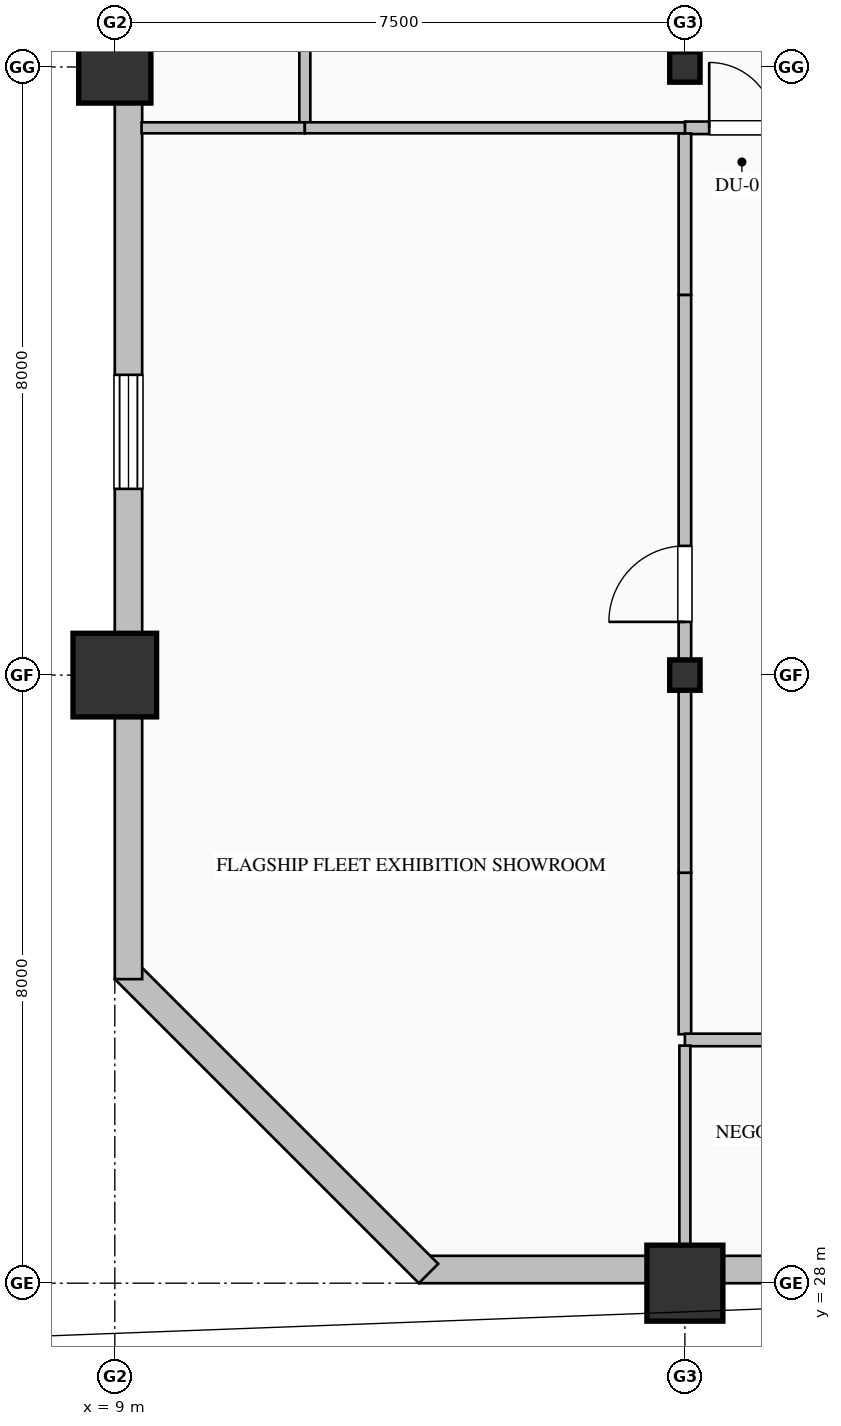
"""IFC4 building model, lengths in metres.
Left out: names, types, materials, properties, quantities, classifications, styles, units other than length and angle.
Written with IfcOpenShell. Run it as: python <this file> out.ifc"""

import sys

from ifc_helpers import new_model, si_unit, direction, frame, frame_2d, origin, origin_2d, place, context, subcontext, project, spatial, rectangle, hollow_rectangle, hollow_circle, i_section, extrude, element, fill, save


model = new_model("IFC4")
c1 = context("Model", 3, precision=1e-05, world=origin(), true_north=direction((0.0, 1.0)))
c2 = subcontext(c1, "Body", "Model", "MODEL_VIEW")
j1 = project(units=[si_unit("LENGTHUNIT", "METRE"), si_unit("PLANEANGLEUNIT", "RADIAN")], contexts=[c1])
p1 = place(None, origin())
s1 = spatial("IfcSite", under=j1, at=p1, CompositionType="ELEMENT")
p2 = place(p1, origin())
s2 = spatial("IfcBuilding", under=s1, at=p2, CompositionType="ELEMENT")
p3 = place(p2, frame((0.0, 0.0, 183.0)))
s3 = spatial("IfcBuildingStorey", under=s2, at=p3, CompositionType="ELEMENT", Elevation=183.0)
p4 = place(p3, frame((9.0, 36.0, 0.0), z_axis=(0.0, 0.0, 1.0), x_axis=(1.0, 0.0, 0.0)))
e1 = element("IfcColumn", 1, at=p4, inside=s3, PredefinedType="COLUMN", context=c2, shape_type="SweptSolid", body=[
    extrude(hollow_rectangle(XDim=1.1, YDim=1.1, WallThickness=0.04, at=origin_2d()), origin(), (0.0, 0.0, 1.0), 4.0),
])
p5 = place(p3, frame((9.0, 44.0, 0.0), z_axis=(0.0, 0.0, 1.0), x_axis=(1.0, 0.0, 0.0)))
e2 = element("IfcColumn", 2, at=p5, inside=s3, PredefinedType="COLUMN", context=c2, shape_type="SweptSolid", body=[
    extrude(hollow_rectangle(XDim=0.95, YDim=0.95, WallThickness=0.036, at=origin_2d()), origin(), (0.0, 0.0, 1.0), 4.0),
])
p6 = place(p3, frame((16.5, 28.0, 0.0), z_axis=(0.0, 0.0, 1.0), x_axis=(1.0, 0.0, 0.0)))
e3 = element("IfcColumn", 3, at=p6, inside=s3, PredefinedType="COLUMN", context=c2, shape_type="SweptSolid", body=[
    extrude(hollow_circle(Radius=0.5, WallThickness=0.036, at=origin_2d()), origin(), (0.0, 0.0, 1.0), 4.0),
])
for number, where, z_axis, x_axis in (
    (4, (16.5, 36.0, 0.0), (0.0, 0.0, 1.0), (1.0, 0.0, 0.0)),
    (5, (16.5, 44.0, 0.0), (0.0, 0.0, 1.0), (1.0, 0.0, 0.0)),
):
    element("IfcColumn", number, at=place(p3, frame(where, z_axis=z_axis, x_axis=x_axis)), inside=s3, PredefinedType="COLUMN", context=c2, shape_type="SweptSolid", body=[
        extrude(i_section(OverallWidth=0.4, OverallDepth=0.4, WebThickness=0.013, FlangeThickness=0.021, FilletRadius=0.022, at=origin_2d()), origin(), (0.0, 0.0, 1.0), 4.0),
    ])
p7 = place(p3, frame((40.52, 28.18, 0.0), z_axis=(0.0, 0.0, 1.0), x_axis=(-1.0, 0.0, 0.0)))
e6 = element("IfcWall", 6, at=p7, inside=s3, PredefinedType="SOLIDWALL", context=c2, shape_type="SweptSolid", body=[
    extrude(rectangle(XDim=27.52, YDim=0.36, at=frame_2d((13.76, 0.0))), origin(), (0.0, 0.0, 1.0), 3.165),
])
p8 = place(p7, frame((13.65, 0.0, 0.85)))
e7 = element("IfcOpeningElement", 7, at=p8, cuts=e6, PredefinedType="OPENING", context=c2, shape_type="SweptSolid", body=[
    extrude(rectangle(XDim=1.5, YDim=1.95, at=frame_2d((0.75, 0.975))), frame((0.0, 0.19, 0.0), z_axis=(0.0, -1.0, 0.0), x_axis=(1.0, 0.0, 0.0)), (0.0, 0.0, 1.0), 0.38),
])
p9 = place(p7, frame((21.0, 0.0, 0.7)))
e8 = element("IfcOpeningElement", 8, at=p9, cuts=e6, PredefinedType="OPENING", context=c2, shape_type="SweptSolid", body=[
    extrude(rectangle(XDim=1.2, YDim=1.85, at=frame_2d((0.6, 0.925))), frame((0.0, 0.19, 0.0), z_axis=(0.0, -1.0, 0.0), x_axis=(1.0, 0.0, 0.0)), (0.0, 0.0, 1.0), 0.38),
])
p10 = place(p3, frame((13.127, 28.127, 0.0), z_axis=(0.0, 0.0, 1.0), x_axis=(-0.707106781187, 0.707106781187, 0.0)))
e9 = element("IfcWall", 9, at=p10, inside=s3, PredefinedType="SOLIDWALL", context=c2, shape_type="SweptSolid", body=[
    extrude(rectangle(XDim=5.657, YDim=0.36, at=frame_2d((2.828, 0.0))), origin(), (0.0, 0.0, 1.0), 3.765),
])
p11 = place(p3, frame((9.18, 32.0, 0.0), z_axis=(0.0, 0.0, 1.0), x_axis=(0.0, 1.0, 0.0)))
e10 = element("IfcWall", 10, at=p11, inside=s3, PredefinedType="SOLIDWALL", context=c2, shape_type="SweptSolid", body=[
    extrude(rectangle(XDim=16.0, YDim=0.36, at=frame_2d((8.0, 0.0))), origin(), (0.0, 0.0, 1.0), 3.265),
])
p12 = place(p11, frame((6.45, 0.0, 0.85)))
e11 = element("IfcOpeningElement", 11, at=p12, cuts=e10, PredefinedType="OPENING", context=c2, shape_type="SweptSolid", body=[
    extrude(rectangle(XDim=1.5, YDim=1.95, at=frame_2d((0.75, 0.975))), frame((0.0, 0.19, 0.0), z_axis=(0.0, -1.0, 0.0), x_axis=(1.0, 0.0, 0.0)), (0.0, 0.0, 1.0), 0.38),
])
p13 = place(p3, frame((16.5, 31.274, 0.0), z_axis=(0.0, 0.0, 1.0), x_axis=(0.0, 1.0, 0.0)))
e12 = element("IfcWall", 12, at=p13, inside=s3, PredefinedType="PARTITIONING", context=c2, shape_type="SweptSolid", body=[
    extrude(rectangle(XDim=2.125, YDim=0.165, at=frame_2d((1.063, 0.0))), origin(), (0.0, 0.0, 1.0), 3.157),
])
p14 = place(p3, frame((23.5, 31.2, 0.0), z_axis=(0.0, 0.0, 1.0), x_axis=(-1.0, 0.0, 0.0)))
e13 = element("IfcWall", 13, at=p14, inside=s3, PredefinedType="PARTITIONING", context=c2, shape_type="SweptSolid", body=[
    extrude(rectangle(XDim=7.0, YDim=0.165, at=frame_2d((3.5, 0.0))), origin(), (0.0, 0.0, 1.0), 3.765),
])
p15 = place(p14, frame((2.95, 0.0, 0.0)))
e14 = element("IfcOpeningElement", 14, at=p15, cuts=e13, PredefinedType="OPENING", context=c2, shape_type="SweptSolid", body=[
    extrude(rectangle(XDim=1.1, YDim=2.2, at=frame_2d((0.55, 1.1))), frame((0.0, 0.093, 0.0), z_axis=(0.0, -1.0, 0.0), x_axis=(1.0, 0.0, 0.0)), (0.0, 0.0, 1.0), 0.185),
])
p16 = place(p3, frame((16.5, 43.2, 0.0), z_axis=(0.0, 0.0, 1.0), x_axis=(1.0, 0.0, 0.0)))
e15 = element("IfcWall", 15, at=p16, inside=s3, PredefinedType="PARTITIONING", context=c2, shape_type="SweptSolid", body=[
    extrude(rectangle(XDim=1.5, YDim=0.165, at=frame_2d((0.75, 0.0))), origin(), (0.0, 0.0, 1.0), 3.765),
])
p17 = place(p16, frame((0.32, 0.0, 0.0)))
e16 = element("IfcOpeningElement", 16, at=p17, cuts=e15, PredefinedType="OPENING", context=c2, shape_type="SweptSolid", body=[
    extrude(rectangle(XDim=0.86, YDim=2.1, at=frame_2d((0.43, 1.05))), frame((0.0, 0.093, 0.0), z_axis=(0.0, -1.0, 0.0), x_axis=(1.0, 0.0, 0.0)), (0.0, 0.0, 1.0), 0.185),
])
p18 = place(p3, frame((16.5, 41.0, 0.0), z_axis=(0.0, 0.0, 1.0), x_axis=(0.0, 1.0, 0.0)))
e17 = element("IfcWall", 17, at=p18, inside=s3, PredefinedType="PARTITIONING", context=c2, shape_type="SweptSolid", body=[
    extrude(rectangle(XDim=2.125, YDim=0.165, at=frame_2d((1.063, 0.0))), origin(), (0.0, 0.0, 1.0), 3.157),
])
p19 = place(p3, frame((16.5, 33.4, 0.0), z_axis=(0.0, 0.0, 1.0), x_axis=(0.0, 1.0, 0.0)))
e18 = element("IfcWall", 18, at=p19, inside=s3, PredefinedType="PARTITIONING", context=c2, shape_type="SweptSolid", body=[
    extrude(rectangle(XDim=7.6, YDim=0.165, at=frame_2d((3.8, 0.0))), origin(), (0.0, 0.0, 1.0), 3.157),
])
p20 = place(p19, frame((3.3, 0.0, 0.0)))
e19 = element("IfcOpeningElement", 19, at=p20, cuts=e18, PredefinedType="OPENING", context=c2, shape_type="SweptSolid", body=[
    extrude(rectangle(XDim=1.0, YDim=2.15, at=frame_2d((0.5, 1.075))), frame((0.0, 0.093, 0.0), z_axis=(0.0, -1.0, 0.0), x_axis=(1.0, 0.0, 0.0)), (0.0, 0.0, 1.0), 0.185),
])
p21 = place(p3, frame((11.5, 50.002, 0.0), z_axis=(0.0, 0.0, 1.0), x_axis=(0.0, -1.0, 0.0)))
e20 = element("IfcWall", 20, at=p21, inside=s3, PredefinedType="PARTITIONING", context=c2, shape_type="SweptSolid", body=[
    extrude(rectangle(XDim=6.738, YDim=0.145, at=frame_2d((3.369, 0.0))), origin(), (0.0, 0.0, 1.0), 3.765),
])
p22 = place(p21, frame((2.869, 0.0, 0.0)))
e21 = element("IfcOpeningElement", 21, at=p22, cuts=e20, PredefinedType="OPENING", context=c2, shape_type="SweptSolid", body=[
    extrude(rectangle(XDim=1.0, YDim=2.15, at=frame_2d((0.5, 1.075))), frame((0.0, 0.083, 0.0), z_axis=(0.0, -1.0, 0.0), x_axis=(1.0, 0.0, 0.0)), (0.0, 0.0, 1.0), 0.165),
])
p23 = place(p3, frame((11.5, 43.2, 0.0), z_axis=(0.0, 0.0, 1.0), x_axis=(-1.0, 0.0, 0.0)))
e22 = element("IfcWall", 22, at=p23, inside=s3, PredefinedType="PARTITIONING", context=c2, shape_type="SweptSolid", body=[
    extrude(rectangle(XDim=2.148, YDim=0.145, at=frame_2d((1.074, 0.0))), origin(), (0.0, 0.0, 1.0), 3.765),
])
p24 = place(p3, frame((16.5, 43.2, 0.0), z_axis=(0.0, 0.0, 1.0), x_axis=(-1.0, 0.0, 0.0)))
e23 = element("IfcWall", 23, at=p24, inside=s3, PredefinedType="PARTITIONING", context=c2, shape_type="SweptSolid", body=[
    extrude(rectangle(XDim=5.0, YDim=0.145, at=frame_2d((2.5, 0.0))), origin(), (0.0, 0.0, 1.0), 3.765),
])
p25 = place(p3, frame((16.5, 31.125, 0.0), z_axis=(0.0, 0.0, 1.0), x_axis=(0.0, -1.0, 0.0)))
e24 = element("IfcWall", 24, at=p25, inside=s3, PredefinedType="PARTITIONING", context=c2, shape_type="SweptSolid", body=[
    extrude(rectangle(XDim=2.773, YDim=0.145, at=frame_2d((1.387, 0.0))), origin(), (0.0, 0.0, 1.0), 3.157),
])
p26 = place(p12, origin())
e25 = element("IfcWindow", 25, at=p26, inside=s3, PartitioningType="DOUBLE_PANEL_VERTICAL", PredefinedType="WINDOW", context=c2, shape_type="SweptSolid", body=[
    extrude(rectangle(XDim=1.5, YDim=1.95, at=frame_2d((0.75, 0.975))), frame((0.0, 0.15, 0.0), z_axis=(0.0, -1.0, 0.0), x_axis=(1.0, 0.0, 0.0)), (0.0, 0.0, 1.0), 0.06),
])
fill(e11, e25)
p27 = place(p17, origin())
e26 = element("IfcDoor", 26, at=p27, inside=s3, OperationType="SINGLE_SWING_LEFT", PredefinedType="DOOR", context=c2, shape_type="SweptSolid", body=[
    extrude(rectangle(XDim=0.86, YDim=2.1, at=frame_2d((0.43, 1.05))), frame((0.0, 0.025, 0.0), z_axis=(0.0, -1.0, 0.0), x_axis=(1.0, 0.0, 0.0)), (0.0, 0.0, 1.0), 0.05),
])
fill(e16, e26)
p28 = place(p20, origin())
e27 = element("IfcDoor", 27, at=p28, inside=s3, OperationType="SINGLE_SWING_LEFT", PredefinedType="DOOR", context=c2, shape_type="SweptSolid", body=[
    extrude(rectangle(XDim=1.0, YDim=2.15, at=frame_2d((0.5, 1.075))), frame((0.0, 0.025, 0.0), z_axis=(0.0, -1.0, 0.0), x_axis=(1.0, 0.0, 0.0)), (0.0, 0.0, 1.0), 0.05),
])
fill(e19, e27)
save(model, sys.argv[1])
